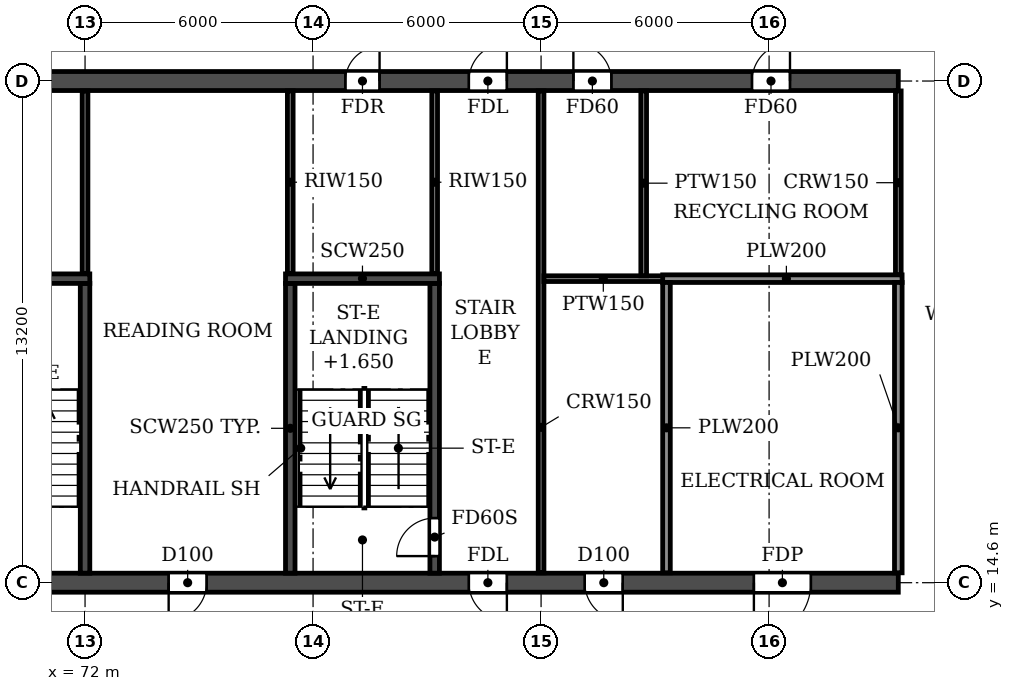
"""IFC4 building model, lengths in metres.
Left out: names, types, materials, properties, quantities, classifications, styles, units other than length and angle.
Written with IfcOpenShell. Run it as: python <this file> out.ifc"""

import sys

from ifc_helpers import new_model, si_unit, direction, frame, frame_2d, origin, place, context, subcontext, project, spatial, rectangle, extrude, element, fill, save


model = new_model("IFC4")
c1 = context("Model", 3, precision=1e-05, world=origin(), true_north=direction((0.0, 1.0)))
c2 = subcontext(c1, "Body", "Model", "MODEL_VIEW")
j1 = project(units=[si_unit("LENGTHUNIT", "METRE"), si_unit("PLANEANGLEUNIT", "RADIAN")], contexts=[c1])
p1 = place(None, origin())
s1 = spatial("IfcSite", under=j1, at=p1, CompositionType="ELEMENT")
p2 = place(p1, origin())
s2 = spatial("IfcBuilding", under=s1, at=p2, CompositionType="ELEMENT")
p3 = place(p2, frame((0.0, 0.0, 72.9)))
s3 = spatial("IfcBuildingStorey", under=s2, at=p3, CompositionType="ELEMENT", Elevation=72.9)
p4 = place(p3, frame((8.6, 14.6, 0.0), z_axis=(0.0, 0.0, 1.0), x_axis=(1.0, 0.0, 0.0)))
e1 = element("IfcWall", 1, at=p4, inside=s3, PredefinedType="SOLIDWALL", context=c2, shape_type="SweptSolid", body=[
    extrude(rectangle(XDim=84.8, YDim=0.5, at=frame_2d((42.4, 0.0))), origin(), (0.0, 0.0, 1.0), 3.06),
])
p5 = place(p4, frame((2.25, 0.0, 0.0)))
e2 = element("IfcOpeningElement", 2, at=p5, cuts=e1, PredefinedType="OPENING", context=c2, shape_type="SweptSolid", body=[
    extrude(rectangle(XDim=1.0, YDim=2.1, at=frame_2d((0.5, 1.05))), frame((0.0, 0.26, 0.0), z_axis=(0.0, -1.0, 0.0), x_axis=(1.0, 0.0, 0.0)), (0.0, 0.0, 1.0), 0.52),
])
p6 = place(p4, frame((6.95, 0.0, 0.0)))
e3 = element("IfcOpeningElement", 3, at=p6, cuts=e1, PredefinedType="OPENING", context=c2, shape_type="SweptSolid", body=[
    extrude(rectangle(XDim=1.0, YDim=2.1, at=frame_2d((0.5, 1.05))), frame((0.0, 0.26, 0.0), z_axis=(0.0, -1.0, 0.0), x_axis=(1.0, 0.0, 0.0)), (0.0, 0.0, 1.0), 0.52),
])
p7 = place(p4, frame((10.3, 0.0, 0.0)))
e4 = element("IfcOpeningElement", 4, at=p7, cuts=e1, PredefinedType="OPENING", context=c2, shape_type="SweptSolid", body=[
    extrude(rectangle(XDim=1.0, YDim=2.1, at=frame_2d((0.5, 1.05))), frame((0.0, 0.26, 0.0), z_axis=(0.0, -1.0, 0.0), x_axis=(1.0, 0.0, 0.0)), (0.0, 0.0, 1.0), 0.52),
])
p8 = place(p4, frame((18.2, 0.0, 0.0)))
e5 = element("IfcOpeningElement", 5, at=p8, cuts=e1, PredefinedType="OPENING", context=c2, shape_type="SweptSolid", body=[
    extrude(rectangle(XDim=1.0, YDim=2.1, at=frame_2d((0.5, 1.05))), frame((0.0, 0.26, 0.0), z_axis=(0.0, -1.0, 0.0), x_axis=(1.0, 0.0, 0.0)), (0.0, 0.0, 1.0), 0.52),
])
p9 = place(p4, frame((22.8, 0.0, 0.0)))
e6 = element("IfcOpeningElement", 6, at=p9, cuts=e1, PredefinedType="OPENING", context=c2, shape_type="SweptSolid", body=[
    extrude(rectangle(XDim=1.0, YDim=2.1, at=frame_2d((0.5, 1.05))), frame((0.0, 0.26, 0.0), z_axis=(0.0, -1.0, 0.0), x_axis=(1.0, 0.0, 0.0)), (0.0, 0.0, 1.0), 0.52),
])
p10 = place(p4, frame((35.4, 0.0, 0.0)))
e7 = element("IfcOpeningElement", 7, at=p10, cuts=e1, PredefinedType="OPENING", context=c2, shape_type="SweptSolid", body=[
    extrude(rectangle(XDim=1.0, YDim=2.1, at=frame_2d((0.5, 1.05))), frame((0.0, 0.26, 0.0), z_axis=(0.0, -1.0, 0.0), x_axis=(1.0, 0.0, 0.0)), (0.0, 0.0, 1.0), 0.52),
])
p11 = place(p4, frame((39.3, 0.0, 0.0)))
e8 = element("IfcOpeningElement", 8, at=p11, cuts=e1, PredefinedType="OPENING", context=c2, shape_type="SweptSolid", body=[
    extrude(rectangle(XDim=1.0, YDim=2.1, at=frame_2d((0.5, 1.05))), frame((0.0, 0.26, 0.0), z_axis=(0.0, -1.0, 0.0), x_axis=(1.0, 0.0, 0.0)), (0.0, 0.0, 1.0), 0.52),
])
p12 = place(p4, frame((41.9, 0.0, 0.0)))
e9 = element("IfcOpeningElement", 9, at=p12, cuts=e1, PredefinedType="OPENING", context=c2, shape_type="SweptSolid", body=[
    extrude(rectangle(XDim=1.0, YDim=2.1, at=frame_2d((0.5, 1.05))), frame((0.0, 0.26, 0.0), z_axis=(0.0, -1.0, 0.0), x_axis=(1.0, 0.0, 0.0)), (0.0, 0.0, 1.0), 0.52),
])
p13 = place(p4, frame((44.5, 0.0, 0.0)))
e10 = element("IfcOpeningElement", 10, at=p13, cuts=e1, PredefinedType="OPENING", context=c2, shape_type="SweptSolid", body=[
    extrude(rectangle(XDim=1.0, YDim=2.1, at=frame_2d((0.5, 1.05))), frame((0.0, 0.26, 0.0), z_axis=(0.0, -1.0, 0.0), x_axis=(1.0, 0.0, 0.0)), (0.0, 0.0, 1.0), 0.52),
])
p14 = place(p4, frame((48.4, 0.0, 0.0)))
e11 = element("IfcOpeningElement", 11, at=p14, cuts=e1, PredefinedType="OPENING", context=c2, shape_type="SweptSolid", body=[
    extrude(rectangle(XDim=1.0, YDim=2.1, at=frame_2d((0.5, 1.05))), frame((0.0, 0.26, 0.0), z_axis=(0.0, -1.0, 0.0), x_axis=(1.0, 0.0, 0.0)), (0.0, 0.0, 1.0), 0.52),
])
p15 = place(p4, frame((61.0, 0.0, 0.0)))
e12 = element("IfcOpeningElement", 12, at=p15, cuts=e1, PredefinedType="OPENING", context=c2, shape_type="SweptSolid", body=[
    extrude(rectangle(XDim=1.0, YDim=2.1, at=frame_2d((0.5, 1.05))), frame((0.0, 0.26, 0.0), z_axis=(0.0, -1.0, 0.0), x_axis=(1.0, 0.0, 0.0)), (0.0, 0.0, 1.0), 0.52),
])
p16 = place(p4, frame((65.6, 0.0, 0.0)))
e13 = element("IfcOpeningElement", 13, at=p16, cuts=e1, PredefinedType="OPENING", context=c2, shape_type="SweptSolid", body=[
    extrude(rectangle(XDim=1.0, YDim=2.1, at=frame_2d((0.5, 1.05))), frame((0.0, 0.26, 0.0), z_axis=(0.0, -1.0, 0.0), x_axis=(1.0, 0.0, 0.0)), (0.0, 0.0, 1.0), 0.52),
])
p17 = place(p4, frame((73.5, 0.0, 0.0)))
e14 = element("IfcOpeningElement", 14, at=p17, cuts=e1, PredefinedType="OPENING", context=c2, shape_type="SweptSolid", body=[
    extrude(rectangle(XDim=1.0, YDim=2.1, at=frame_2d((0.5, 1.05))), frame((0.0, 0.26, 0.0), z_axis=(0.0, -1.0, 0.0), x_axis=(1.0, 0.0, 0.0)), (0.0, 0.0, 1.0), 0.52),
])
p18 = place(p4, frame((76.55, 0.0, 0.0)))
e15 = element("IfcOpeningElement", 15, at=p18, cuts=e1, PredefinedType="OPENING", context=c2, shape_type="SweptSolid", body=[
    extrude(rectangle(XDim=1.0, YDim=2.1, at=frame_2d((0.5, 1.05))), frame((0.0, 0.26, 0.0), z_axis=(0.0, -1.0, 0.0), x_axis=(1.0, 0.0, 0.0)), (0.0, 0.0, 1.0), 0.52),
])
p19 = place(p4, frame((81.0, 0.0, 0.0)))
e16 = element("IfcOpeningElement", 16, at=p19, cuts=e1, PredefinedType="OPENING", context=c2, shape_type="SweptSolid", body=[
    extrude(rectangle(XDim=1.5, YDim=2.1, at=frame_2d((0.75, 1.05))), frame((0.0, 0.26, 0.0), z_axis=(0.0, -1.0, 0.0), x_axis=(1.0, 0.0, 0.0)), (0.0, 0.0, 1.0), 0.52),
])
p20 = place(p3, frame((8.6, 27.8, 0.0), z_axis=(0.0, 0.0, 1.0), x_axis=(1.0, 0.0, 0.0)))
e17 = element("IfcWall", 17, at=p20, inside=s3, PredefinedType="SOLIDWALL", context=c2, shape_type="SweptSolid", body=[
    extrude(rectangle(XDim=84.8, YDim=0.5, at=frame_2d((42.4, 0.0))), origin(), (0.0, 0.0, 1.0), 3.06),
])
p21 = place(p20, frame((2.0, 0.0, 0.0)))
e18 = element("IfcOpeningElement", 18, at=p21, cuts=e17, PredefinedType="OPENING", context=c2, shape_type="SweptSolid", body=[
    extrude(rectangle(XDim=1.5, YDim=2.1, at=frame_2d((0.75, 1.05))), frame((0.0, 0.26, 0.0), z_axis=(0.0, -1.0, 0.0), x_axis=(1.0, 0.0, 0.0)), (0.0, 0.0, 1.0), 0.52),
])
p22 = place(p20, frame((6.95, 0.0, 0.0)))
e19 = element("IfcOpeningElement", 19, at=p22, cuts=e17, PredefinedType="OPENING", context=c2, shape_type="SweptSolid", body=[
    extrude(rectangle(XDim=1.0, YDim=2.1, at=frame_2d((0.5, 1.05))), frame((0.0, 0.26, 0.0), z_axis=(0.0, -1.0, 0.0), x_axis=(1.0, 0.0, 0.0)), (0.0, 0.0, 1.0), 0.52),
])
p23 = place(p20, frame((10.3, 0.0, 0.0)))
e20 = element("IfcOpeningElement", 20, at=p23, cuts=e17, PredefinedType="OPENING", context=c2, shape_type="SweptSolid", body=[
    extrude(rectangle(XDim=1.0, YDim=2.1, at=frame_2d((0.5, 1.05))), frame((0.0, 0.26, 0.0), z_axis=(0.0, -1.0, 0.0), x_axis=(1.0, 0.0, 0.0)), (0.0, 0.0, 1.0), 0.52),
])
p24 = place(p20, frame((13.65, 0.0, 0.0)))
e21 = element("IfcOpeningElement", 21, at=p24, cuts=e17, PredefinedType="OPENING", context=c2, shape_type="SweptSolid", body=[
    extrude(rectangle(XDim=0.9, YDim=2.1, at=frame_2d((0.45, 1.05))), frame((0.0, 0.26, 0.0), z_axis=(0.0, -1.0, 0.0), x_axis=(1.0, 0.0, 0.0)), (0.0, 0.0, 1.0), 0.52),
])
p25 = place(p20, frame((22.85, 0.0, 0.0)))
e22 = element("IfcOpeningElement", 22, at=p25, cuts=e17, PredefinedType="OPENING", context=c2, shape_type="SweptSolid", body=[
    extrude(rectangle(XDim=0.9, YDim=2.1, at=frame_2d((0.45, 1.05))), frame((0.0, 0.26, 0.0), z_axis=(0.0, -1.0, 0.0), x_axis=(1.0, 0.0, 0.0)), (0.0, 0.0, 1.0), 0.52),
])
p26 = place(p20, frame((26.0, 0.0, 0.0)))
e23 = element("IfcOpeningElement", 23, at=p26, cuts=e17, PredefinedType="OPENING", context=c2, shape_type="SweptSolid", body=[
    extrude(rectangle(XDim=1.0, YDim=2.1, at=frame_2d((0.5, 1.05))), frame((0.0, 0.26, 0.0), z_axis=(0.0, -1.0, 0.0), x_axis=(1.0, 0.0, 0.0)), (0.0, 0.0, 1.0), 0.52),
])
p27 = place(p20, frame((31.2, 0.0, 0.0)))
e24 = element("IfcOpeningElement", 24, at=p27, cuts=e17, PredefinedType="OPENING", context=c2, shape_type="SweptSolid", body=[
    extrude(rectangle(XDim=1.0, YDim=2.1, at=frame_2d((0.5, 1.05))), frame((0.0, 0.26, 0.0), z_axis=(0.0, -1.0, 0.0), x_axis=(1.0, 0.0, 0.0)), (0.0, 0.0, 1.0), 0.52),
])
p28 = place(p20, frame((39.0, 0.0, 0.0)))
e25 = element("IfcOpeningElement", 25, at=p28, cuts=e17, PredefinedType="OPENING", context=c2, shape_type="SweptSolid", body=[
    extrude(rectangle(XDim=1.0, YDim=2.1, at=frame_2d((0.5, 1.05))), frame((0.0, 0.26, 0.0), z_axis=(0.0, -1.0, 0.0), x_axis=(1.0, 0.0, 0.0)), (0.0, 0.0, 1.0), 0.52),
])
p29 = place(p20, frame((41.9, 0.0, 0.0)))
e26 = element("IfcOpeningElement", 26, at=p29, cuts=e17, PredefinedType="OPENING", context=c2, shape_type="SweptSolid", body=[
    extrude(rectangle(XDim=1.0, YDim=2.1, at=frame_2d((0.5, 1.05))), frame((0.0, 0.26, 0.0), z_axis=(0.0, -1.0, 0.0), x_axis=(1.0, 0.0, 0.0)), (0.0, 0.0, 1.0), 0.52),
])
p30 = place(p20, frame((44.8, 0.0, 0.0)))
e27 = element("IfcOpeningElement", 27, at=p30, cuts=e17, PredefinedType="OPENING", context=c2, shape_type="SweptSolid", body=[
    extrude(rectangle(XDim=1.0, YDim=2.1, at=frame_2d((0.5, 1.05))), frame((0.0, 0.26, 0.0), z_axis=(0.0, -1.0, 0.0), x_axis=(1.0, 0.0, 0.0)), (0.0, 0.0, 1.0), 0.52),
])
p31 = place(p20, frame((48.7, 0.0, 0.0)))
e28 = element("IfcOpeningElement", 28, at=p31, cuts=e17, PredefinedType="OPENING", context=c2, shape_type="SweptSolid", body=[
    extrude(rectangle(XDim=1.0, YDim=2.1, at=frame_2d((0.5, 1.05))), frame((0.0, 0.26, 0.0), z_axis=(0.0, -1.0, 0.0), x_axis=(1.0, 0.0, 0.0)), (0.0, 0.0, 1.0), 0.52),
])
p32 = place(p20, frame((55.2, 0.0, 0.0)))
e29 = element("IfcOpeningElement", 29, at=p32, cuts=e17, PredefinedType="OPENING", context=c2, shape_type="SweptSolid", body=[
    extrude(rectangle(XDim=1.0, YDim=2.1, at=frame_2d((0.5, 1.05))), frame((0.0, 0.26, 0.0), z_axis=(0.0, -1.0, 0.0), x_axis=(1.0, 0.0, 0.0)), (0.0, 0.0, 1.0), 0.52),
])
p33 = place(p20, frame((61.05, 0.0, 0.0)))
e30 = element("IfcOpeningElement", 30, at=p33, cuts=e17, PredefinedType="OPENING", context=c2, shape_type="SweptSolid", body=[
    extrude(rectangle(XDim=0.9, YDim=2.1, at=frame_2d((0.45, 1.05))), frame((0.0, 0.26, 0.0), z_axis=(0.0, -1.0, 0.0), x_axis=(1.0, 0.0, 0.0)), (0.0, 0.0, 1.0), 0.52),
])
p34 = place(p20, frame((70.25, 0.0, 0.0)))
e31 = element("IfcOpeningElement", 31, at=p34, cuts=e17, PredefinedType="OPENING", context=c2, shape_type="SweptSolid", body=[
    extrude(rectangle(XDim=0.9, YDim=2.1, at=frame_2d((0.45, 1.05))), frame((0.0, 0.26, 0.0), z_axis=(0.0, -1.0, 0.0), x_axis=(1.0, 0.0, 0.0)), (0.0, 0.0, 1.0), 0.52),
])
p35 = place(p20, frame((73.5, 0.0, 0.0)))
e32 = element("IfcOpeningElement", 32, at=p35, cuts=e17, PredefinedType="OPENING", context=c2, shape_type="SweptSolid", body=[
    extrude(rectangle(XDim=1.0, YDim=2.1, at=frame_2d((0.5, 1.05))), frame((0.0, 0.26, 0.0), z_axis=(0.0, -1.0, 0.0), x_axis=(1.0, 0.0, 0.0)), (0.0, 0.0, 1.0), 0.52),
])
p36 = place(p20, frame((76.25, 0.0, 0.0)))
e33 = element("IfcOpeningElement", 33, at=p36, cuts=e17, PredefinedType="OPENING", context=c2, shape_type="SweptSolid", body=[
    extrude(rectangle(XDim=1.0, YDim=2.1, at=frame_2d((0.5, 1.05))), frame((0.0, 0.26, 0.0), z_axis=(0.0, -1.0, 0.0), x_axis=(1.0, 0.0, 0.0)), (0.0, 0.0, 1.0), 0.52),
])
p37 = place(p20, frame((80.95, 0.0, 0.0)))
e34 = element("IfcOpeningElement", 34, at=p37, cuts=e17, PredefinedType="OPENING", context=c2, shape_type="SweptSolid", body=[
    extrude(rectangle(XDim=1.0, YDim=2.1, at=frame_2d((0.5, 1.05))), frame((0.0, 0.26, 0.0), z_axis=(0.0, -1.0, 0.0), x_axis=(1.0, 0.0, 0.0)), (0.0, 0.0, 1.0), 0.52),
])
p38 = place(p3, frame((72.0, 14.85, 0.0), z_axis=(0.0, 0.0, 1.0), x_axis=(0.0, 1.0, 0.0)))
e35 = element("IfcWall", 35, at=p38, inside=s3, PredefinedType="SOLIDWALL", context=c2, shape_type="SweptSolid", body=[
    extrude(rectangle(XDim=7.625, YDim=0.25, at=frame_2d((3.812, 0.0))), origin(), (0.0, 0.0, 1.0), 3.06),
])
p39 = place(p3, frame((68.075, 22.6, 0.0), z_axis=(0.0, 0.0, 1.0), x_axis=(1.0, 0.0, 0.0)))
e36 = element("IfcWall", 36, at=p39, inside=s3, PredefinedType="SOLIDWALL", context=c2, shape_type="SweptSolid", body=[
    extrude(rectangle(XDim=4.05, YDim=0.25, at=frame_2d((2.025, 0.0))), origin(), (0.0, 0.0, 1.0), 3.06),
])
p40 = place(p3, frame((77.4, 14.85, 0.0), z_axis=(0.0, 0.0, 1.0), x_axis=(0.0, 1.0, 0.0)))
e37 = element("IfcWall", 37, at=p40, inside=s3, PredefinedType="SOLIDWALL", context=c2, shape_type="SweptSolid", body=[
    extrude(rectangle(XDim=7.625, YDim=0.25, at=frame_2d((3.812, 0.0))), origin(), (0.0, 0.0, 1.0), 3.06),
])
p41 = place(p3, frame((81.2, 14.85, 0.0), z_axis=(0.0, 0.0, 1.0), x_axis=(0.0, 1.0, 0.0)))
e38 = element("IfcWall", 38, at=p41, inside=s3, PredefinedType="SOLIDWALL", context=c2, shape_type="SweptSolid", body=[
    extrude(rectangle(XDim=7.625, YDim=0.25, at=frame_2d((3.812, 0.0))), origin(), (0.0, 0.0, 1.0), 3.06),
])
p42 = place(p41, frame((0.45, 0.0, 0.0)))
e39 = element("IfcOpeningElement", 39, at=p42, cuts=e38, PredefinedType="OPENING", context=c2, shape_type="SweptSolid", body=[
    extrude(rectangle(XDim=1.0, YDim=2.1, at=frame_2d((0.5, 1.05))), frame((0.0, 0.135, 0.0), z_axis=(0.0, -1.0, 0.0), x_axis=(1.0, 0.0, 0.0)), (0.0, 0.0, 1.0), 0.27),
])
p43 = place(p3, frame((77.275, 22.6, 0.0), z_axis=(0.0, 0.0, 1.0), x_axis=(1.0, 0.0, 0.0)))
e40 = element("IfcWall", 40, at=p43, inside=s3, PredefinedType="SOLIDWALL", context=c2, shape_type="SweptSolid", body=[
    extrude(rectangle(XDim=4.05, YDim=0.25, at=frame_2d((2.025, 0.0))), origin(), (0.0, 0.0, 1.0), 3.06),
])
p44 = place(p3, frame((84.0, 14.86, 0.0), z_axis=(0.0, 0.0, 1.0), x_axis=(0.0, 1.0, 0.0)))
e41 = element("IfcWall", 41, at=p44, inside=s3, PredefinedType="PARTITIONING", context=c2, shape_type="SweptSolid", body=[
    extrude(rectangle(XDim=12.68, YDim=0.15, at=frame_2d((6.34, 0.0))), origin(), (0.0, 0.0, 1.0), 3.06),
])
p45 = place(p3, frame((93.4, 22.7, 0.0), z_axis=(0.0, 0.0, 1.0), x_axis=(0.0, 1.0, 0.0)))
e42 = element("IfcWall", 42, at=p45, inside=s3, PredefinedType="PARTITIONING", context=c2, shape_type="SweptSolid", body=[
    extrude(rectangle(XDim=4.84, YDim=0.15, at=frame_2d((2.42, 0.0))), origin(), (0.0, 0.0, 1.0), 3.06),
])
p46 = place(p3, frame((84.075, 22.6, 0.0), z_axis=(0.0, 0.0, 1.0), x_axis=(1.0, 0.0, 0.0)))
e43 = element("IfcWall", 43, at=p46, inside=s3, PredefinedType="PARTITIONING", context=c2, shape_type="SweptSolid", body=[
    extrude(rectangle(XDim=3.325, YDim=0.15, at=frame_2d((1.663, 0.0))), origin(), (0.0, 0.0, 1.0), 3.06),
])
p47 = place(p3, frame((86.7, 22.675, 0.0), z_axis=(0.0, 0.0, 1.0), x_axis=(0.0, 1.0, 0.0)))
e44 = element("IfcWall", 44, at=p47, inside=s3, PredefinedType="PARTITIONING", context=c2, shape_type="SweptSolid", body=[
    extrude(rectangle(XDim=4.865, YDim=0.15, at=frame_2d((2.433, 0.0))), origin(), (0.0, 0.0, 1.0), 3.06),
])
p48 = place(p3, frame((87.2, 22.6, 0.0), z_axis=(0.0, 0.0, 1.0), x_axis=(1.0, 0.0, 0.0)))
e45 = element("IfcWall", 45, at=p48, inside=s3, PredefinedType="PARTITIONING", context=c2, shape_type="SweptSolid", body=[
    extrude(rectangle(XDim=6.3, YDim=0.2, at=frame_2d((3.15, 0.0))), origin(), (0.0, 0.0, 1.0), 3.06),
])
for number, where, z_axis, x_axis in (
    (46, (87.3, 14.86, 0.0), (0.0, 0.0, 1.0), (0.0, 1.0, 0.0)),
    (47, (93.4, 14.86, 0.0), (0.0, 0.0, 1.0), (0.0, 1.0, 0.0)),
):
    element("IfcWall", number, at=place(p3, frame(where, z_axis=z_axis, x_axis=x_axis)), inside=s3, PredefinedType="PARTITIONING", context=c2, shape_type="SweptSolid", body=[
        extrude(rectangle(XDim=7.64, YDim=0.2, at=frame_2d((3.82, 0.0))), origin(), (0.0, 0.0, 1.0), 3.06),
    ])
for number, where, z_axis, x_axis in (
    (48, (72.0, 22.735, 0.0), (0.0, 0.0, 1.0), (0.0, 1.0, 0.0)),
    (49, (77.4, 22.735, 0.0), (0.0, 0.0, 1.0), (0.0, 1.0, 0.0)),
    (50, (81.2, 22.735, 0.0), (0.0, 0.0, 1.0), (0.0, 1.0, 0.0)),
):
    element("IfcWall", number, at=place(p3, frame(where, z_axis=z_axis, x_axis=x_axis)), inside=s3, PredefinedType="PARTITIONING", context=c2, shape_type="SweptSolid", body=[
        extrude(rectangle(XDim=4.805, YDim=0.15, at=frame_2d((2.402, 0.0))), origin(), (0.0, 0.0, 1.0), 3.06),
    ])
p49 = place(p34, origin())
e51 = element("IfcDoor", 51, at=p49, inside=s3, OperationType="SINGLE_SWING_RIGHT", PredefinedType="DOOR", context=c2, shape_type="SweptSolid", body=[
    extrude(rectangle(XDim=0.9, YDim=2.1, at=frame_2d((0.45, 1.05))), frame((0.0, 0.025, 0.0), z_axis=(0.0, -1.0, 0.0), x_axis=(1.0, 0.0, 0.0)), (0.0, 0.0, 1.0), 0.05),
])
fill(e31, e51)
p50 = place(p35, origin())
e52 = element("IfcDoor", 52, at=p50, inside=s3, OperationType="SINGLE_SWING_RIGHT", PredefinedType="DOOR", context=c2, shape_type="SweptSolid", body=[
    extrude(rectangle(XDim=1.0, YDim=2.1, at=frame_2d((0.5, 1.05))), frame((0.0, 0.025, 0.0), z_axis=(0.0, -1.0, 0.0), x_axis=(1.0, 0.0, 0.0)), (0.0, 0.0, 1.0), 0.05),
])
fill(e32, e52)
p51 = place(p36, origin())
e53 = element("IfcDoor", 53, at=p51, inside=s3, OperationType="SINGLE_SWING_LEFT", PredefinedType="DOOR", context=c2, shape_type="SweptSolid", body=[
    extrude(rectangle(XDim=1.0, YDim=2.1, at=frame_2d((0.5, 1.05))), frame((0.0, 0.025, 0.0), z_axis=(0.0, -1.0, 0.0), x_axis=(1.0, 0.0, 0.0)), (0.0, 0.0, 1.0), 0.05),
])
fill(e33, e53)
p52 = place(p37, origin())
e54 = element("IfcDoor", 54, at=p52, inside=s3, OperationType="SINGLE_SWING_RIGHT", PredefinedType="DOOR", context=c2, shape_type="SweptSolid", body=[
    extrude(rectangle(XDim=1.0, YDim=2.1, at=frame_2d((0.5, 1.05))), frame((0.0, 0.025, 0.0), z_axis=(0.0, -1.0, 0.0), x_axis=(1.0, 0.0, 0.0)), (0.0, 0.0, 1.0), 0.05),
])
fill(e34, e54)
p53 = place(p16, frame((1.0, 0.0, 0.0), z_axis=(0.0, 0.0, 1.0), x_axis=(-1.0, 0.0, 0.0)))
e55 = element("IfcDoor", 55, at=p53, inside=s3, OperationType="SINGLE_SWING_RIGHT", PredefinedType="DOOR", context=c2, shape_type="SweptSolid", body=[
    extrude(rectangle(XDim=1.0, YDim=2.1, at=frame_2d((0.5, 1.05))), frame((0.0, 0.025, 0.0), z_axis=(0.0, -1.0, 0.0), x_axis=(1.0, 0.0, 0.0)), (0.0, 0.0, 1.0), 0.05),
])
fill(e13, e55)
p54 = place(p17, frame((1.0, 0.0, 0.0), z_axis=(0.0, 0.0, 1.0), x_axis=(-1.0, 0.0, 0.0)))
e56 = element("IfcDoor", 56, at=p54, inside=s3, OperationType="SINGLE_SWING_LEFT", PredefinedType="DOOR", context=c2, shape_type="SweptSolid", body=[
    extrude(rectangle(XDim=1.0, YDim=2.1, at=frame_2d((0.5, 1.05))), frame((0.0, 0.025, 0.0), z_axis=(0.0, -1.0, 0.0), x_axis=(1.0, 0.0, 0.0)), (0.0, 0.0, 1.0), 0.05),
])
fill(e14, e56)
p55 = place(p18, frame((1.0, 0.0, 0.0), z_axis=(0.0, 0.0, 1.0), x_axis=(-1.0, 0.0, 0.0)))
e57 = element("IfcDoor", 57, at=p55, inside=s3, OperationType="SINGLE_SWING_LEFT", PredefinedType="DOOR", context=c2, shape_type="SweptSolid", body=[
    extrude(rectangle(XDim=1.0, YDim=2.1, at=frame_2d((0.5, 1.05))), frame((0.0, 0.025, 0.0), z_axis=(0.0, -1.0, 0.0), x_axis=(1.0, 0.0, 0.0)), (0.0, 0.0, 1.0), 0.05),
])
fill(e15, e57)
p56 = place(p19, frame((1.5, 0.0, 0.0), z_axis=(0.0, 0.0, 1.0), x_axis=(-1.0, 0.0, 0.0)))
e58 = element("IfcDoor", 58, at=p56, inside=s3, OperationType="DOUBLE_DOOR_SINGLE_SWING", PredefinedType="DOOR", context=c2, shape_type="SweptSolid", body=[
    extrude(rectangle(XDim=1.5, YDim=2.1, at=frame_2d((0.75, 1.05))), frame((0.0, 0.025, 0.0), z_axis=(0.0, -1.0, 0.0), x_axis=(1.0, 0.0, 0.0)), (0.0, 0.0, 1.0), 0.05),
])
fill(e16, e58)
p57 = place(p42, origin())
e59 = element("IfcDoor", 59, at=p57, inside=s3, OperationType="SINGLE_SWING_LEFT", PredefinedType="DOOR", context=c2, shape_type="SweptSolid", body=[
    extrude(rectangle(XDim=1.0, YDim=2.1, at=frame_2d((0.5, 1.05))), frame((0.0, 0.025, 0.0), z_axis=(0.0, -1.0, 0.0), x_axis=(1.0, 0.0, 0.0)), (0.0, 0.0, 1.0), 0.05),
])
fill(e39, e59)
save(model, sys.argv[1])
